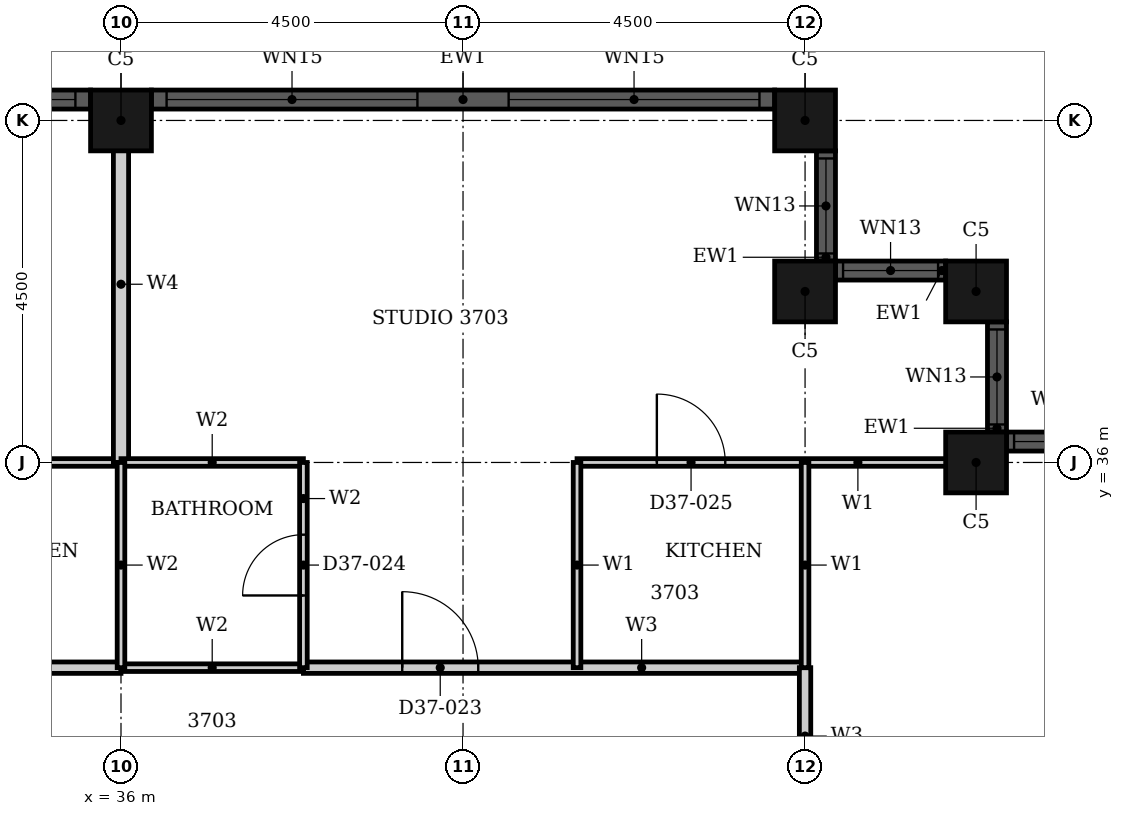
"""IFC4 building model, lengths in metres.
Left out: names, types, materials, properties, quantities, classifications, styles, units other than length and angle.
Written with IfcOpenShell. Run it as: python <this file> out.ifc"""

import sys

from ifc_helpers import new_model, si_unit, direction, frame, frame_2d, origin, origin_2d, place, context, subcontext, project, spatial, rectangle, hollow_rectangle, extrude, element, fill, save


model = new_model("IFC4")
c1 = context("Model", 3, precision=1e-05, world=origin(), true_north=direction((0.0, 1.0)))
c2 = subcontext(c1, "Body", "Model", "MODEL_VIEW")
j1 = project(units=[si_unit("LENGTHUNIT", "METRE"), si_unit("PLANEANGLEUNIT", "RADIAN")], contexts=[c1])
p1 = place(None, origin())
s1 = spatial("IfcSite", under=j1, at=p1, CompositionType="ELEMENT")
p2 = place(p1, origin())
s2 = spatial("IfcBuilding", under=s1, at=p2, CompositionType="ELEMENT")
p3 = place(p2, frame((0.0, 0.0, 150.6)))
s3 = spatial("IfcBuildingStorey", under=s2, at=p3, CompositionType="ELEMENT", Elevation=150.6)
for number, where, z_axis, x_axis in (
    (1, (47.25, 36.0, 0.0), (0.0, 0.0, 1.0), (1.0, 0.0, 0.0)),
    (2, (47.25, 38.25, 0.0), (0.0, 0.0, 1.0), (1.0, 0.0, 0.0)),
    (3, (45.0, 38.25, 0.0), (0.0, 0.0, 1.0), (1.0, 0.0, 0.0)),
    (4, (45.0, 40.5, 0.0), (0.0, 0.0, 1.0), (1.0, 0.0, 0.0)),
    (5, (36.0, 40.5, 0.0), (0.0, 0.0, 1.0), (1.0, 0.0, 0.0)),
):
    element("IfcColumn", number, at=place(p3, frame(where, z_axis=z_axis, x_axis=x_axis)), inside=s3, PredefinedType="COLUMN", context=c2, shape_type="SweptSolid", body=[
        extrude(hollow_rectangle(XDim=0.8, YDim=0.8, WallThickness=0.025, at=origin_2d()), origin(), (0.0, 0.0, 1.0), 3.7),
    ])
p4 = place(p3, frame((49.1, 36.275, 0.0), z_axis=(0.0, 0.0, 1.0), x_axis=(-1.0, 0.0, 0.0)))
e6 = element("IfcWall", 6, at=p4, inside=s3, PredefinedType="SOLIDWALL", context=c2, shape_type="SweptSolid", body=[
    extrude(rectangle(XDim=1.45, YDim=0.25, at=frame_2d((0.725, 0.0))), origin(), (0.0, 0.0, 1.0), 3.7),
])
p5 = place(p4, frame((0.1, 0.0, 0.9)))
e7 = element("IfcOpeningElement", 7, at=p5, cuts=e6, PredefinedType="OPENING", context=c2, shape_type="SweptSolid", body=[
    extrude(rectangle(XDim=1.25, YDim=1.85, at=frame_2d((0.625, 0.925))), frame((0.0, 0.135, 0.0), z_axis=(0.0, -1.0, 0.0), x_axis=(1.0, 0.0, 0.0)), (0.0, 0.0, 1.0), 0.27),
])
p6 = place(p3, frame((47.525, 36.4, 0.0), z_axis=(0.0, 0.0, 1.0), x_axis=(0.0, 1.0, 0.0)))
e8 = element("IfcWall", 8, at=p6, inside=s3, PredefinedType="SOLIDWALL", context=c2, shape_type="SweptSolid", body=[
    extrude(rectangle(XDim=1.45, YDim=0.25, at=frame_2d((0.725, 0.0))), origin(), (0.0, 0.0, 1.0), 3.7),
])
p7 = place(p6, frame((0.1, 0.0, 0.9)))
e9 = element("IfcOpeningElement", 9, at=p7, cuts=e8, PredefinedType="OPENING", context=c2, shape_type="SweptSolid", body=[
    extrude(rectangle(XDim=1.25, YDim=1.85, at=frame_2d((0.625, 0.925))), frame((0.0, 0.135, 0.0), z_axis=(0.0, -1.0, 0.0), x_axis=(1.0, 0.0, 0.0)), (0.0, 0.0, 1.0), 0.27),
])
p8 = place(p3, frame((46.85, 38.525, 0.0), z_axis=(0.0, 0.0, 1.0), x_axis=(-1.0, 0.0, 0.0)))
e10 = element("IfcWall", 10, at=p8, inside=s3, PredefinedType="SOLIDWALL", context=c2, shape_type="SweptSolid", body=[
    extrude(rectangle(XDim=1.45, YDim=0.25, at=frame_2d((0.725, 0.0))), origin(), (0.0, 0.0, 1.0), 3.7),
])
p9 = place(p8, frame((0.1, 0.0, 0.9)))
e11 = element("IfcOpeningElement", 11, at=p9, cuts=e10, PredefinedType="OPENING", context=c2, shape_type="SweptSolid", body=[
    extrude(rectangle(XDim=1.25, YDim=1.85, at=frame_2d((0.625, 0.925))), frame((0.0, 0.135, 0.0), z_axis=(0.0, -1.0, 0.0), x_axis=(1.0, 0.0, 0.0)), (0.0, 0.0, 1.0), 0.27),
])
p10 = place(p3, frame((45.275, 38.65, 0.0), z_axis=(0.0, 0.0, 1.0), x_axis=(0.0, 1.0, 0.0)))
e12 = element("IfcWall", 12, at=p10, inside=s3, PredefinedType="SOLIDWALL", context=c2, shape_type="SweptSolid", body=[
    extrude(rectangle(XDim=1.45, YDim=0.25, at=frame_2d((0.725, 0.0))), origin(), (0.0, 0.0, 1.0), 3.7),
])
p11 = place(p10, frame((0.1, 0.0, 0.9)))
e13 = element("IfcOpeningElement", 13, at=p11, cuts=e12, PredefinedType="OPENING", context=c2, shape_type="SweptSolid", body=[
    extrude(rectangle(XDim=1.25, YDim=1.85, at=frame_2d((0.625, 0.925))), frame((0.0, 0.135, 0.0), z_axis=(0.0, -1.0, 0.0), x_axis=(1.0, 0.0, 0.0)), (0.0, 0.0, 1.0), 0.27),
])
p12 = place(p3, frame((44.6, 40.775, 0.0), z_axis=(0.0, 0.0, 1.0), x_axis=(-1.0, 0.0, 0.0)))
e14 = element("IfcWall", 14, at=p12, inside=s3, PredefinedType="SOLIDWALL", context=c2, shape_type="SweptSolid", body=[
    extrude(rectangle(XDim=8.2, YDim=0.25, at=frame_2d((4.1, 0.0))), origin(), (0.0, 0.0, 1.0), 3.7),
])
p13 = place(p12, frame((0.2, 0.0, 0.45)))
e15 = element("IfcOpeningElement", 15, at=p13, cuts=e14, PredefinedType="OPENING", context=c2, shape_type="SweptSolid", body=[
    extrude(rectangle(XDim=3.3, YDim=2.3, at=frame_2d((1.65, 1.15))), frame((0.0, 0.135, 0.0), z_axis=(0.0, -1.0, 0.0), x_axis=(1.0, 0.0, 0.0)), (0.0, 0.0, 1.0), 0.27),
])
p14 = place(p12, frame((4.7, 0.0, 0.45)))
e16 = element("IfcOpeningElement", 16, at=p14, cuts=e14, PredefinedType="OPENING", context=c2, shape_type="SweptSolid", body=[
    extrude(rectangle(XDim=3.3, YDim=2.3, at=frame_2d((1.65, 1.15))), frame((0.0, 0.135, 0.0), z_axis=(0.0, -1.0, 0.0), x_axis=(1.0, 0.0, 0.0)), (0.0, 0.0, 1.0), 0.27),
])
p15 = place(p3, frame((35.6, 40.775, 0.0), z_axis=(0.0, 0.0, 1.0), x_axis=(-1.0, 0.0, 0.0)))
e17 = element("IfcWall", 17, at=p15, inside=s3, PredefinedType="SOLIDWALL", context=c2, shape_type="SweptSolid", body=[
    extrude(rectangle(XDim=8.2, YDim=0.25, at=frame_2d((4.1, 0.0))), origin(), (0.0, 0.0, 1.0), 3.7),
])
p16 = place(p15, frame((0.2, 0.0, 0.45)))
e18 = element("IfcOpeningElement", 18, at=p16, cuts=e17, PredefinedType="OPENING", context=c2, shape_type="SweptSolid", body=[
    extrude(rectangle(XDim=3.3, YDim=2.3, at=frame_2d((1.65, 1.15))), frame((0.0, 0.135, 0.0), z_axis=(0.0, -1.0, 0.0), x_axis=(1.0, 0.0, 0.0)), (0.0, 0.0, 1.0), 0.27),
])
p17 = place(p15, frame((4.7, 0.0, 0.45)))
e19 = element("IfcOpeningElement", 19, at=p17, cuts=e17, PredefinedType="OPENING", context=c2, shape_type="SweptSolid", body=[
    extrude(rectangle(XDim=3.3, YDim=2.3, at=frame_2d((1.65, 1.15))), frame((0.0, 0.135, 0.0), z_axis=(0.0, -1.0, 0.0), x_axis=(1.0, 0.0, 0.0)), (0.0, 0.0, 1.0), 0.27),
])
p18 = place(p3, frame((29.4, 33.3, 0.0), z_axis=(0.0, 0.0, 1.0), x_axis=(1.0, 0.0, 0.0)))
e20 = element("IfcWall", 20, at=p18, inside=s3, PredefinedType="PARTITIONING", context=c2, shape_type="SweptSolid", body=[
    extrude(rectangle(XDim=6.6, YDim=0.15, at=frame_2d((3.3, 0.0))), origin(), (0.0, 0.0, 1.0), 3.4),
])
p19 = place(p18, frame((1.3, 0.0, 0.0)))
e21 = element("IfcOpeningElement", 21, at=p19, cuts=e20, PredefinedType="OPENING", context=c2, shape_type="SweptSolid", body=[
    extrude(rectangle(XDim=1.0, YDim=2.2, at=frame_2d((0.5, 1.1))), frame((0.0, 0.085, 0.0), z_axis=(0.0, -1.0, 0.0), x_axis=(1.0, 0.0, 0.0)), (0.0, 0.0, 1.0), 0.17),
])
p20 = place(p3, frame((38.4, 33.3, 0.0), z_axis=(0.0, 0.0, 1.0), x_axis=(1.0, 0.0, 0.0)))
e22 = element("IfcWall", 22, at=p20, inside=s3, PredefinedType="PARTITIONING", context=c2, shape_type="SweptSolid", body=[
    extrude(rectangle(XDim=6.6, YDim=0.15, at=frame_2d((3.3, 0.0))), origin(), (0.0, 0.0, 1.0), 3.4),
])
p21 = place(p20, frame((1.3, 0.0, 0.0)))
e23 = element("IfcOpeningElement", 23, at=p21, cuts=e22, PredefinedType="OPENING", context=c2, shape_type="SweptSolid", body=[
    extrude(rectangle(XDim=1.0, YDim=2.2, at=frame_2d((0.5, 1.1))), frame((0.0, 0.085, 0.0), z_axis=(0.0, -1.0, 0.0), x_axis=(1.0, 0.0, 0.0)), (0.0, 0.0, 1.0), 0.17),
])
p22 = place(p3, frame((45.0, 31.5, 0.0), z_axis=(0.0, 0.0, 1.0), x_axis=(0.0, 1.0, 0.0)))
e24 = element("IfcWall", 24, at=p22, inside=s3, PredefinedType="PARTITIONING", context=c2, shape_type="SweptSolid", body=[
    extrude(rectangle(XDim=1.8, YDim=0.15, at=frame_2d((0.9, 0.0))), origin(), (0.0, 0.0, 1.0), 3.4),
])
p23 = place(p3, frame((33.0, 36.0, 0.0), z_axis=(0.0, 0.0, 1.0), x_axis=(1.0, 0.0, 0.0)))
e25 = element("IfcWall", 25, at=p23, inside=s3, PredefinedType="PARTITIONING", context=c2, shape_type="SweptSolid", body=[
    extrude(rectangle(XDim=3.0, YDim=0.1, at=frame_2d((1.5, 0.0))), origin(), (0.0, 0.0, 1.0), 3.4),
])
p24 = place(p23, frame((1.05, 0.0, 0.0)))
e26 = element("IfcOpeningElement", 26, at=p24, cuts=e25, PredefinedType="OPENING", context=c2, shape_type="SweptSolid", body=[
    extrude(rectangle(XDim=0.9, YDim=2.1, at=frame_2d((0.45, 1.05))), frame((0.0, 0.06, 0.0), z_axis=(0.0, -1.0, 0.0), x_axis=(1.0, 0.0, 0.0)), (0.0, 0.0, 1.0), 0.12),
])
p25 = place(p3, frame((42.0, 36.0, 0.0), z_axis=(0.0, 0.0, 1.0), x_axis=(1.0, 0.0, 0.0)))
e27 = element("IfcWall", 27, at=p25, inside=s3, PredefinedType="PARTITIONING", context=c2, shape_type="SweptSolid", body=[
    extrude(rectangle(XDim=5.44, YDim=0.1, at=frame_2d((2.72, 0.0))), origin(), (0.0, 0.0, 1.0), 3.4),
])
p26 = place(p25, frame((1.05, 0.0, 0.0)))
e28 = element("IfcOpeningElement", 28, at=p26, cuts=e27, PredefinedType="OPENING", context=c2, shape_type="SweptSolid", body=[
    extrude(rectangle(XDim=0.9, YDim=2.1, at=frame_2d((0.45, 1.05))), frame((0.0, 0.06, 0.0), z_axis=(0.0, -1.0, 0.0), x_axis=(1.0, 0.0, 0.0)), (0.0, 0.0, 1.0), 0.12),
])
for number, where, z_axis, x_axis in (
    (29, (42.0, 33.3, 0.0), (0.0, 0.0, 1.0), (0.0, 1.0, 0.0)),
    (30, (45.0, 33.3, 0.0), (0.0, 0.0, 1.0), (0.0, 1.0, 0.0)),
):
    element("IfcWall", number, at=place(p3, frame(where, z_axis=z_axis, x_axis=x_axis)), inside=s3, PredefinedType="PARTITIONING", context=c2, shape_type="SweptSolid", body=[
        extrude(rectangle(XDim=2.7, YDim=0.1, at=frame_2d((1.35, 0.0))), origin(), (0.0, 0.0, 1.0), 3.4),
    ])
p27 = place(p3, frame((36.0, 36.0, 0.0), z_axis=(0.0, 0.0, 1.0), x_axis=(0.0, 1.0, 0.0)))
e31 = element("IfcWall", 31, at=p27, inside=s3, PredefinedType="PARTITIONING", context=c2, shape_type="SweptSolid", body=[
    extrude(rectangle(XDim=4.69, YDim=0.2, at=frame_2d((2.345, 0.0))), origin(), (0.0, 0.0, 1.0), 3.4),
])
for number, where, z_axis, x_axis in (
    (32, (36.0, 33.3, 0.0), (0.0, 0.0, 1.0), (1.0, 0.0, 0.0)),
    (33, (36.0, 36.0, 0.0), (0.0, 0.0, 1.0), (1.0, 0.0, 0.0)),
):
    element("IfcWall", number, at=place(p3, frame(where, z_axis=z_axis, x_axis=x_axis)), inside=s3, PredefinedType="PARTITIONING", context=c2, shape_type="SweptSolid", body=[
        extrude(rectangle(XDim=2.4, YDim=0.1, at=frame_2d((1.2, 0.0))), origin(), (0.0, 0.0, 1.0), 3.4),
    ])
p28 = place(p3, frame((36.0, 33.3, 0.0), z_axis=(0.0, 0.0, 1.0), x_axis=(0.0, 1.0, 0.0)))
e34 = element("IfcWall", 34, at=p28, inside=s3, PredefinedType="PARTITIONING", context=c2, shape_type="SweptSolid", body=[
    extrude(rectangle(XDim=2.7, YDim=0.1, at=frame_2d((1.35, 0.0))), origin(), (0.0, 0.0, 1.0), 3.4),
])
p29 = place(p3, frame((38.4, 33.3, 0.0), z_axis=(0.0, 0.0, 1.0), x_axis=(0.0, 1.0, 0.0)))
e35 = element("IfcWall", 35, at=p29, inside=s3, PredefinedType="PARTITIONING", context=c2, shape_type="SweptSolid", body=[
    extrude(rectangle(XDim=2.7, YDim=0.1, at=frame_2d((1.35, 0.0))), origin(), (0.0, 0.0, 1.0), 3.4),
])
p30 = place(p29, frame((0.95, 0.0, 0.0)))
e36 = element("IfcOpeningElement", 36, at=p30, cuts=e35, PredefinedType="OPENING", context=c2, shape_type="SweptSolid", body=[
    extrude(rectangle(XDim=0.8, YDim=2.1, at=frame_2d((0.4, 1.05))), frame((0.0, 0.06, 0.0), z_axis=(0.0, -1.0, 0.0), x_axis=(1.0, 0.0, 0.0)), (0.0, 0.0, 1.0), 0.12),
])
p31 = place(p5, origin())
e37 = element("IfcWindow", 37, at=p31, inside=s3, PartitioningType="SINGLE_PANEL", PredefinedType="WINDOW", context=c2, shape_type="SweptSolid", body=[
    extrude(rectangle(XDim=1.25, YDim=1.85, at=frame_2d((0.625, 0.925))), frame((0.0, 0.03, 0.0), z_axis=(0.0, -1.0, 0.0), x_axis=(1.0, 0.0, 0.0)), (0.0, 0.0, 1.0), 0.06),
])
fill(e7, e37)
p32 = place(p7, origin())
e38 = element("IfcWindow", 38, at=p32, inside=s3, PartitioningType="SINGLE_PANEL", PredefinedType="WINDOW", context=c2, shape_type="SweptSolid", body=[
    extrude(rectangle(XDim=1.25, YDim=1.85, at=frame_2d((0.625, 0.925))), frame((0.0, 0.03, 0.0), z_axis=(0.0, -1.0, 0.0), x_axis=(1.0, 0.0, 0.0)), (0.0, 0.0, 1.0), 0.06),
])
fill(e9, e38)
p33 = place(p9, origin())
e39 = element("IfcWindow", 39, at=p33, inside=s3, PartitioningType="SINGLE_PANEL", PredefinedType="WINDOW", context=c2, shape_type="SweptSolid", body=[
    extrude(rectangle(XDim=1.25, YDim=1.85, at=frame_2d((0.625, 0.925))), frame((0.0, 0.03, 0.0), z_axis=(0.0, -1.0, 0.0), x_axis=(1.0, 0.0, 0.0)), (0.0, 0.0, 1.0), 0.06),
])
fill(e11, e39)
p34 = place(p11, origin())
e40 = element("IfcWindow", 40, at=p34, inside=s3, PartitioningType="SINGLE_PANEL", PredefinedType="WINDOW", context=c2, shape_type="SweptSolid", body=[
    extrude(rectangle(XDim=1.25, YDim=1.85, at=frame_2d((0.625, 0.925))), frame((0.0, 0.03, 0.0), z_axis=(0.0, -1.0, 0.0), x_axis=(1.0, 0.0, 0.0)), (0.0, 0.0, 1.0), 0.06),
])
fill(e13, e40)
p35 = place(p13, origin())
e41 = element("IfcWindow", 41, at=p35, inside=s3, PartitioningType="SINGLE_PANEL", PredefinedType="WINDOW", context=c2, shape_type="SweptSolid", body=[
    extrude(rectangle(XDim=3.3, YDim=2.3, at=frame_2d((1.65, 1.15))), frame((0.0, 0.03, 0.0), z_axis=(0.0, -1.0, 0.0), x_axis=(1.0, 0.0, 0.0)), (0.0, 0.0, 1.0), 0.06),
])
fill(e15, e41)
p36 = place(p14, origin())
e42 = element("IfcWindow", 42, at=p36, inside=s3, PartitioningType="SINGLE_PANEL", PredefinedType="WINDOW", context=c2, shape_type="SweptSolid", body=[
    extrude(rectangle(XDim=3.3, YDim=2.3, at=frame_2d((1.65, 1.15))), frame((0.0, 0.03, 0.0), z_axis=(0.0, -1.0, 0.0), x_axis=(1.0, 0.0, 0.0)), (0.0, 0.0, 1.0), 0.06),
])
fill(e16, e42)
p37 = place(p16, origin())
e43 = element("IfcWindow", 43, at=p37, inside=s3, PartitioningType="SINGLE_PANEL", PredefinedType="WINDOW", context=c2, shape_type="SweptSolid", body=[
    extrude(rectangle(XDim=3.3, YDim=2.3, at=frame_2d((1.65, 1.15))), frame((0.0, 0.03, 0.0), z_axis=(0.0, -1.0, 0.0), x_axis=(1.0, 0.0, 0.0)), (0.0, 0.0, 1.0), 0.06),
])
fill(e18, e43)
p38 = place(p21, origin())
e44 = element("IfcDoor", 44, at=p38, inside=s3, OperationType="SINGLE_SWING_LEFT", PredefinedType="DOOR", context=c2, shape_type="SweptSolid", body=[
    extrude(rectangle(XDim=1.0, YDim=2.2, at=frame_2d((0.5, 1.1))), frame((0.0, 0.025, 0.0), z_axis=(0.0, -1.0, 0.0), x_axis=(1.0, 0.0, 0.0)), (0.0, 0.0, 1.0), 0.05),
])
fill(e23, e44)
p39 = place(p30, origin())
e45 = element("IfcDoor", 45, at=p39, inside=s3, OperationType="SINGLE_SWING_RIGHT", PredefinedType="DOOR", context=c2, shape_type="SweptSolid", body=[
    extrude(rectangle(XDim=0.8, YDim=2.1, at=frame_2d((0.4, 1.05))), frame((0.0, 0.025, 0.0), z_axis=(0.0, -1.0, 0.0), x_axis=(1.0, 0.0, 0.0)), (0.0, 0.0, 1.0), 0.05),
])
fill(e36, e45)
p40 = place(p26, origin())
e46 = element("IfcDoor", 46, at=p40, inside=s3, OperationType="SINGLE_SWING_LEFT", PredefinedType="DOOR", context=c2, shape_type="SweptSolid", body=[
    extrude(rectangle(XDim=0.9, YDim=2.1, at=frame_2d((0.45, 1.05))), frame((0.0, 0.025, 0.0), z_axis=(0.0, -1.0, 0.0), x_axis=(1.0, 0.0, 0.0)), (0.0, 0.0, 1.0), 0.05),
])
fill(e28, e46)
save(model, sys.argv[1])
